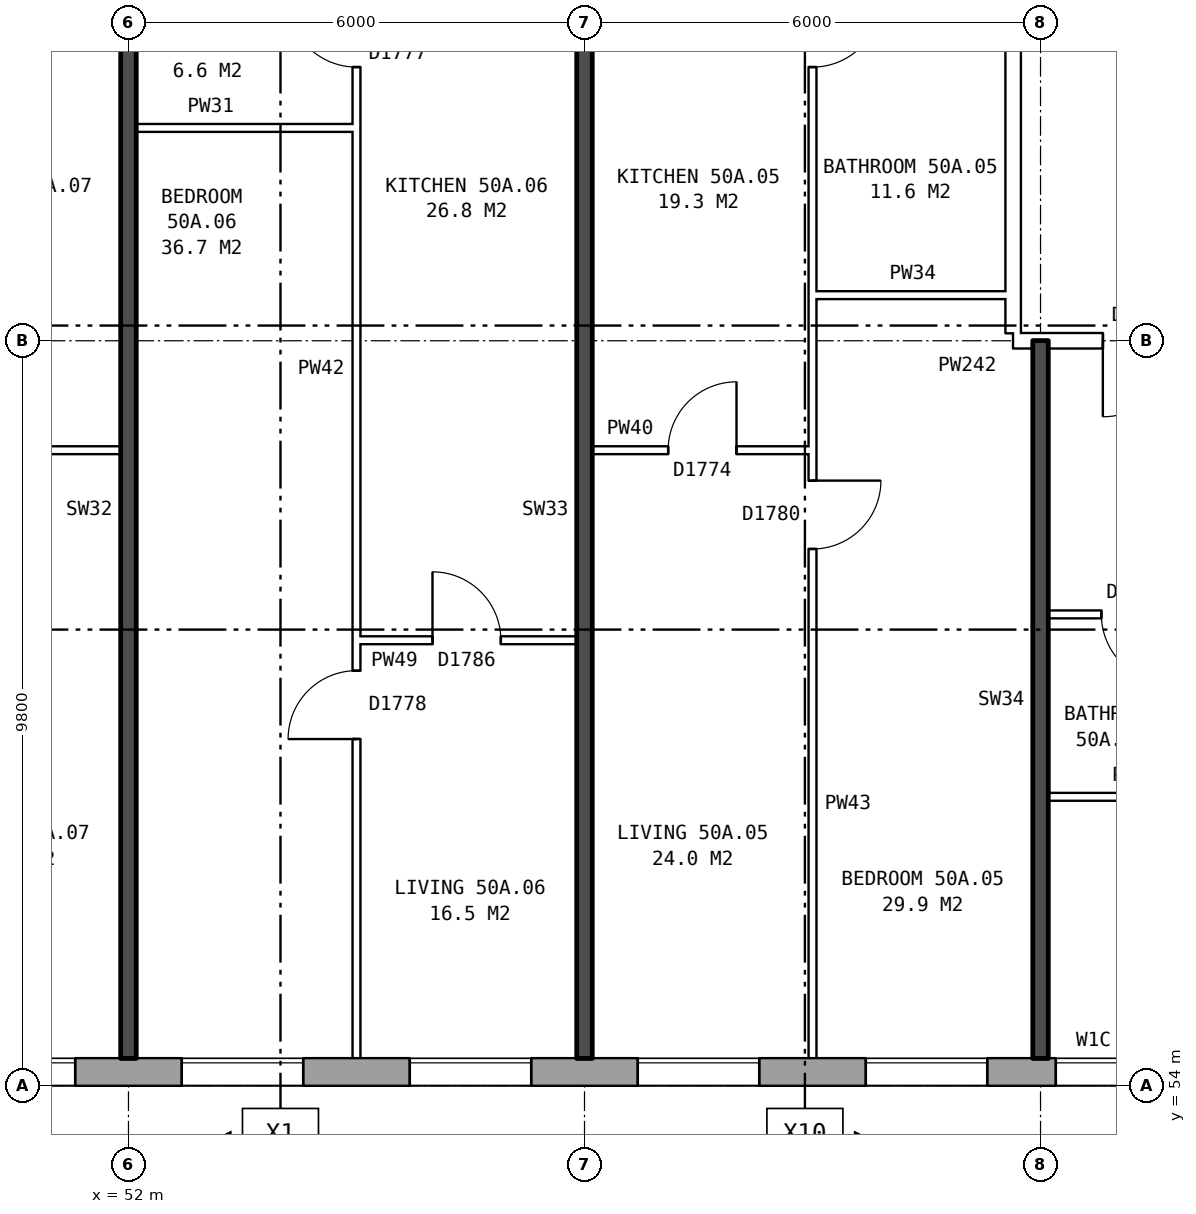
"""IFC4 building model, lengths in metres.
Left out: names, types, materials, properties, quantities, classifications, styles, units other than length and angle.
Written with IfcOpenShell. Run it as: python <this file> out.ifc"""

import sys

from ifc_helpers import new_model, si_unit, direction, frame, frame_2d, origin, place, context, subcontext, project, spatial, rectangle, extrude, element, fill, save


model = new_model("IFC4")
c1 = context("Model", 3, precision=1e-05, world=origin(), true_north=direction((0.0, 1.0)))
c2 = subcontext(c1, "Body", "Model", "MODEL_VIEW")
j1 = project(units=[si_unit("LENGTHUNIT", "METRE"), si_unit("PLANEANGLEUNIT", "RADIAN")], contexts=[c1])
p1 = place(None, origin())
s1 = spatial("IfcSite", under=j1, at=p1, CompositionType="ELEMENT")
p2 = place(p1, origin())
s2 = spatial("IfcBuilding", under=s1, at=p2, CompositionType="ELEMENT")
p3 = place(p2, frame((0.0, 0.0, 178.9)))
s3 = spatial("IfcBuildingStorey", under=s2, at=p3, CompositionType="ELEMENT", Elevation=178.9)
p4 = place(p3, frame((33.325, 54.18, 0.0), z_axis=(0.0, 0.0, 1.0), x_axis=(1.0, 0.0, 0.0)))
e1 = element("IfcWall", 1, at=p4, inside=s3, PredefinedType="STANDARD", context=c2, shape_type="SweptSolid", body=[
    extrude(rectangle(XDim=39.601, YDim=0.36, at=frame_2d((19.8, 0.0))), origin(), (0.0, 0.0, 1.0), 2.85),
])
p5 = place(p4, frame((1.375, 0.0, 0.8)))
e2 = element("IfcOpeningElement", 2, at=p5, cuts=e1, PredefinedType="OPENING", context=c2, shape_type="SweptSolid", body=[
    extrude(rectangle(XDim=1.6, YDim=1.8, at=frame_2d((0.8, 0.9))), frame((0.0, 0.19, 0.0), z_axis=(0.0, -1.0, 0.0), x_axis=(1.0, 0.0, 0.0)), (0.0, 0.0, 1.0), 0.38),
])
p6 = place(p4, frame((3.275, 0.0, 0.8)))
e3 = element("IfcOpeningElement", 3, at=p6, cuts=e1, PredefinedType="OPENING", context=c2, shape_type="SweptSolid", body=[
    extrude(rectangle(XDim=1.4, YDim=1.8, at=frame_2d((0.7, 0.9))), frame((0.0, 0.19, 0.0), z_axis=(0.0, -1.0, 0.0), x_axis=(1.0, 0.0, 0.0)), (0.0, 0.0, 1.0), 0.38),
])
p7 = place(p4, frame((7.375, 0.0, 0.8)))
e4 = element("IfcOpeningElement", 4, at=p7, cuts=e1, PredefinedType="OPENING", context=c2, shape_type="SweptSolid", body=[
    extrude(rectangle(XDim=1.6, YDim=1.8, at=frame_2d((0.8, 0.9))), frame((0.0, 0.19, 0.0), z_axis=(0.0, -1.0, 0.0), x_axis=(1.0, 0.0, 0.0)), (0.0, 0.0, 1.0), 0.38),
])
p8 = place(p4, frame((10.375, 0.0, 0.8)))
e5 = element("IfcOpeningElement", 5, at=p8, cuts=e1, PredefinedType="OPENING", context=c2, shape_type="SweptSolid", body=[
    extrude(rectangle(XDim=1.6, YDim=1.8, at=frame_2d((0.8, 0.9))), frame((0.0, 0.19, 0.0), z_axis=(0.0, -1.0, 0.0), x_axis=(1.0, 0.0, 0.0)), (0.0, 0.0, 1.0), 0.38),
])
p9 = place(p4, frame((13.375, 0.0, 0.8)))
e6 = element("IfcOpeningElement", 6, at=p9, cuts=e1, PredefinedType="OPENING", context=c2, shape_type="SweptSolid", body=[
    extrude(rectangle(XDim=1.6, YDim=1.8, at=frame_2d((0.8, 0.9))), frame((0.0, 0.19, 0.0), z_axis=(0.0, -1.0, 0.0), x_axis=(1.0, 0.0, 0.0)), (0.0, 0.0, 1.0), 0.38),
])
p10 = place(p4, frame((16.375, 0.0, 0.8)))
e7 = element("IfcOpeningElement", 7, at=p10, cuts=e1, PredefinedType="OPENING", context=c2, shape_type="SweptSolid", body=[
    extrude(rectangle(XDim=1.6, YDim=1.8, at=frame_2d((0.8, 0.9))), frame((0.0, 0.19, 0.0), z_axis=(0.0, -1.0, 0.0), x_axis=(1.0, 0.0, 0.0)), (0.0, 0.0, 1.0), 0.38),
])
p11 = place(p4, frame((19.375, 0.0, 0.8)))
e8 = element("IfcOpeningElement", 8, at=p11, cuts=e1, PredefinedType="OPENING", context=c2, shape_type="SweptSolid", body=[
    extrude(rectangle(XDim=1.6, YDim=1.8, at=frame_2d((0.8, 0.9))), frame((0.0, 0.19, 0.0), z_axis=(0.0, -1.0, 0.0), x_axis=(1.0, 0.0, 0.0)), (0.0, 0.0, 1.0), 0.38),
])
p12 = place(p4, frame((22.375, 0.0, 0.8)))
e9 = element("IfcOpeningElement", 9, at=p12, cuts=e1, PredefinedType="OPENING", context=c2, shape_type="SweptSolid", body=[
    extrude(rectangle(XDim=1.6, YDim=1.8, at=frame_2d((0.8, 0.9))), frame((0.0, 0.19, 0.0), z_axis=(0.0, -1.0, 0.0), x_axis=(1.0, 0.0, 0.0)), (0.0, 0.0, 1.0), 0.38),
])
p13 = place(p4, frame((25.375, 0.0, 0.8)))
e10 = element("IfcOpeningElement", 10, at=p13, cuts=e1, PredefinedType="OPENING", context=c2, shape_type="SweptSolid", body=[
    extrude(rectangle(XDim=1.6, YDim=1.8, at=frame_2d((0.8, 0.9))), frame((0.0, 0.19, 0.0), z_axis=(0.0, -1.0, 0.0), x_axis=(1.0, 0.0, 0.0)), (0.0, 0.0, 1.0), 0.38),
])
p14 = place(p4, frame((28.375, 0.0, 0.8)))
e11 = element("IfcOpeningElement", 11, at=p14, cuts=e1, PredefinedType="OPENING", context=c2, shape_type="SweptSolid", body=[
    extrude(rectangle(XDim=1.6, YDim=1.8, at=frame_2d((0.8, 0.9))), frame((0.0, 0.19, 0.0), z_axis=(0.0, -1.0, 0.0), x_axis=(1.0, 0.0, 0.0)), (0.0, 0.0, 1.0), 0.38),
])
p15 = place(p4, frame((30.875, 0.0, 0.8)))
e12 = element("IfcOpeningElement", 12, at=p15, cuts=e1, PredefinedType="OPENING", context=c2, shape_type="SweptSolid", body=[
    extrude(rectangle(XDim=1.0, YDim=1.8, at=frame_2d((0.5, 0.9))), frame((0.0, 0.19, 0.0), z_axis=(0.0, -1.0, 0.0), x_axis=(1.0, 0.0, 0.0)), (0.0, 0.0, 1.0), 0.38),
])
p16 = place(p4, frame((32.175, 0.0, 0.8)))
e13 = element("IfcOpeningElement", 13, at=p16, cuts=e1, PredefinedType="OPENING", context=c2, shape_type="SweptSolid", body=[
    extrude(rectangle(XDim=0.6, YDim=0.9, at=frame_2d((0.3, 0.45))), frame((0.0, 0.19, 0.0), z_axis=(0.0, -1.0, 0.0), x_axis=(1.0, 0.0, 0.0)), (0.0, 0.0, 1.0), 0.38),
])
p17 = place(p4, frame((37.375, 0.0, 0.8)))
e14 = element("IfcOpeningElement", 14, at=p17, cuts=e1, PredefinedType="OPENING", context=c2, shape_type="SweptSolid", body=[
    extrude(rectangle(XDim=1.6, YDim=1.8, at=frame_2d((0.8, 0.9))), frame((0.0, 0.19, 0.0), z_axis=(0.0, -1.0, 0.0), x_axis=(1.0, 0.0, 0.0)), (0.0, 0.0, 1.0), 0.38),
])
p18 = place(p4, frame((4.975, 0.0, 1.6)))
e15 = element("IfcOpeningElement", 15, at=p18, cuts=e1, PredefinedType="OPENING", context=c2, shape_type="SweptSolid", body=[
    extrude(rectangle(XDim=0.6, YDim=0.9, at=frame_2d((0.3, 0.45))), frame((0.0, 0.19, 0.0), z_axis=(0.0, -1.0, 0.0), x_axis=(1.0, 0.0, 0.0)), (0.0, 0.0, 1.0), 0.38),
])
p19 = place(p4, frame((33.925, 0.0, 1.7)))
e16 = element("IfcOpeningElement", 16, at=p19, cuts=e1, PredefinedType="OPENING", context=c2, shape_type="SweptSolid", body=[
    extrude(rectangle(XDim=0.6, YDim=0.9, at=frame_2d((0.3, 0.45))), frame((0.0, 0.19, 0.0), z_axis=(0.0, -1.0, 0.0), x_axis=(1.0, 0.0, 0.0)), (0.0, 0.0, 1.0), 0.38),
])
p20 = place(p4, frame((34.825, 0.0, 0.8)))
e17 = element("IfcOpeningElement", 17, at=p20, cuts=e1, PredefinedType="OPENING", context=c2, shape_type="SweptSolid", body=[
    extrude(rectangle(XDim=1.6, YDim=1.8, at=frame_2d((0.8, 0.9))), frame((0.0, 0.19, 0.0), z_axis=(0.0, -1.0, 0.0), x_axis=(1.0, 0.0, 0.0)), (0.0, 0.0, 1.0), 0.38),
])
p21 = place(p3, frame((63.64, 63.9, 0.0), z_axis=(0.0, 0.0, 1.0), x_axis=(0.0, 1.0, 0.0)))
e18 = element("IfcWall", 18, at=p21, inside=s3, PredefinedType="PARTITIONING", context=c2, shape_type="SweptSolid", body=[
    extrude(rectangle(XDim=12.2, YDim=0.2, at=frame_2d((6.1, 0.0))), origin(), (0.0, 0.0, 1.0), 2.85),
])
p22 = place(p21, frame((5.1, 0.0, 0.0)))
e19 = element("IfcOpeningElement", 19, at=p22, cuts=e18, PredefinedType="OPENING", context=c2, shape_type="SweptSolid", body=[
    extrude(rectangle(XDim=2.0, YDim=2.1, at=frame_2d((1.0, 1.05))), frame((0.0, 0.11, 0.0), z_axis=(0.0, -1.0, 0.0), x_axis=(1.0, 0.0, 0.0)), (0.0, 0.0, 1.0), 0.22),
])
p23 = place(p3, frame((64.1, 57.8, 0.0), z_axis=(0.0, 0.0, 1.0), x_axis=(1.0, 0.0, 0.0)))
e20 = element("IfcWall", 20, at=p23, inside=s3, PredefinedType="PARTITIONING", context=c2, shape_type="SweptSolid", body=[
    extrude(rectangle(XDim=2.3, YDim=0.1, at=frame_2d((1.15, 0.0))), origin(), (0.0, 0.0, 1.0), 2.85),
])
p24 = place(p3, frame((55.0, 59.86, 0.0), z_axis=(0.0, 0.0, 1.0), x_axis=(1.0, 0.0, 0.0)))
e21 = element("IfcWall", 21, at=p24, inside=s3, PredefinedType="PARTITIONING", context=c2, shape_type="SweptSolid", body=[
    extrude(rectangle(XDim=2.9, YDim=0.1, at=frame_2d((1.45, 0.0))), origin(), (0.0, 0.0, 1.0), 2.85),
])
p25 = place(p24, frame((1.0, 0.0, 0.0)))
e22 = element("IfcOpeningElement", 22, at=p25, cuts=e21, PredefinedType="OPENING", context=c2, shape_type="SweptSolid", body=[
    extrude(rectangle(XDim=0.9, YDim=2.1, at=frame_2d((0.45, 1.05))), frame((0.0, 0.06, 0.0), z_axis=(0.0, -1.0, 0.0), x_axis=(1.0, 0.0, 0.0)), (0.0, 0.0, 1.0), 0.12),
])
p26 = place(p3, frame((64.1, 60.2, 0.0), z_axis=(0.0, 0.0, 1.0), x_axis=(1.0, 0.0, 0.0)))
e23 = element("IfcWall", 23, at=p26, inside=s3, PredefinedType="PARTITIONING", context=c2, shape_type="SweptSolid", body=[
    extrude(rectangle(XDim=5.8, YDim=0.1, at=frame_2d((2.9, 0.0))), origin(), (0.0, 0.0, 1.0), 2.85),
])
p27 = place(p26, frame((3.6, 0.0, 0.0)))
e24 = element("IfcOpeningElement", 24, at=p27, cuts=e23, PredefinedType="OPENING", context=c2, shape_type="SweptSolid", body=[
    extrude(rectangle(XDim=0.9, YDim=2.1, at=frame_2d((0.45, 1.05))), frame((0.0, 0.06, 0.0), z_axis=(0.0, -1.0, 0.0), x_axis=(1.0, 0.0, 0.0)), (0.0, 0.0, 1.0), 0.12),
])
p28 = place(p26, frame((0.7, 0.0, 0.0)))
e25 = element("IfcOpeningElement", 25, at=p28, cuts=e23, PredefinedType="OPENING", context=c2, shape_type="SweptSolid", body=[
    extrude(rectangle(XDim=0.9, YDim=2.1, at=frame_2d((0.45, 1.05))), frame((0.0, 0.06, 0.0), z_axis=(0.0, -1.0, 0.0), x_axis=(1.0, 0.0, 0.0)), (0.0, 0.0, 1.0), 0.12),
])
p29 = place(p3, frame((49.0, 62.36, 0.0), z_axis=(0.0, 0.0, 1.0), x_axis=(1.0, 0.0, 0.0)))
e26 = element("IfcWall", 26, at=p29, inside=s3, PredefinedType="PARTITIONING", context=c2, shape_type="SweptSolid", body=[
    extrude(rectangle(XDim=2.9, YDim=0.1, at=frame_2d((1.45, 0.0))), origin(), (0.0, 0.0, 1.0), 2.85),
])
p30 = place(p29, frame((1.0, 0.0, 0.0)))
e27 = element("IfcOpeningElement", 27, at=p30, cuts=e26, PredefinedType="OPENING", context=c2, shape_type="SweptSolid", body=[
    extrude(rectangle(XDim=0.9, YDim=2.1, at=frame_2d((0.45, 1.05))), frame((0.0, 0.06, 0.0), z_axis=(0.0, -1.0, 0.0), x_axis=(1.0, 0.0, 0.0)), (0.0, 0.0, 1.0), 0.12),
])
p31 = place(p3, frame((58.1, 62.36, 0.0), z_axis=(0.0, 0.0, 1.0), x_axis=(1.0, 0.0, 0.0)))
e28 = element("IfcWall", 28, at=p31, inside=s3, PredefinedType="PARTITIONING", context=c2, shape_type="SweptSolid", body=[
    extrude(rectangle(XDim=2.9, YDim=0.1, at=frame_2d((1.45, 0.0))), origin(), (0.0, 0.0, 1.0), 2.85),
])
p32 = place(p31, frame((1.0, 0.0, 0.0)))
e29 = element("IfcOpeningElement", 29, at=p32, cuts=e28, PredefinedType="OPENING", context=c2, shape_type="SweptSolid", body=[
    extrude(rectangle(XDim=0.9, YDim=2.1, at=frame_2d((0.45, 1.05))), frame((0.0, 0.06, 0.0), z_axis=(0.0, -1.0, 0.0), x_axis=(1.0, 0.0, 0.0)), (0.0, 0.0, 1.0), 0.12),
])
p33 = place(p3, frame((63.64, 63.8, 0.0), z_axis=(0.0, 0.0, 1.0), x_axis=(1.0, 0.0, 0.0)))
e30 = element("IfcWall", 30, at=p33, inside=s3, PredefinedType="PARTITIONING", context=c2, shape_type="SweptSolid", body=[
    extrude(rectangle(XDim=3.0, YDim=0.2, at=frame_2d((1.5, 0.0))), origin(), (0.0, 0.0, 1.0), 2.85),
])
p34 = place(p33, frame((1.18, 0.0, 0.0)))
e31 = element("IfcOpeningElement", 31, at=p34, cuts=e30, PredefinedType="OPENING", context=c2, shape_type="SweptSolid", body=[
    extrude(rectangle(XDim=1.0, YDim=2.1, at=frame_2d((0.5, 1.05))), frame((0.0, 0.11, 0.0), z_axis=(0.0, -1.0, 0.0), x_axis=(1.0, 0.0, 0.0)), (0.0, 0.0, 1.0), 0.22),
])
p35 = place(p3, frame((61.0, 64.4, 0.0), z_axis=(0.0, 0.0, 1.0), x_axis=(1.0, 0.0, 0.0)))
e32 = element("IfcWall", 32, at=p35, inside=s3, PredefinedType="PARTITIONING", context=c2, shape_type="SweptSolid", body=[
    extrude(rectangle(XDim=2.64, YDim=0.1, at=frame_2d((1.32, 0.0))), origin(), (0.0, 0.0, 1.0), 2.85),
])
p36 = place(p3, frame((52.1, 66.6, 0.0), z_axis=(0.0, 0.0, 1.0), x_axis=(1.0, 0.0, 0.0)))
e33 = element("IfcWall", 33, at=p36, inside=s3, PredefinedType="PARTITIONING", context=c2, shape_type="SweptSolid", body=[
    extrude(rectangle(XDim=2.9, YDim=0.1, at=frame_2d((1.45, 0.0))), origin(), (0.0, 0.0, 1.0), 2.85),
])
p37 = place(p3, frame((52.0, 54.36, 0.0), z_axis=(0.0, 0.0, 1.0), x_axis=(0.0, 1.0, 0.0)))
e34 = element("IfcWall", 34, at=p37, inside=s3, PredefinedType="SOLIDWALL", context=c2, shape_type="SweptSolid", body=[
    extrude(rectangle(XDim=14.44, YDim=0.2, at=frame_2d((7.22, 0.0))), origin(), (0.0, 0.0, 1.0), 2.85),
])
p38 = place(p3, frame((55.0, 54.36, 0.0), z_axis=(0.0, 0.0, 1.0), x_axis=(0.0, 1.0, 0.0)))
e35 = element("IfcWall", 35, at=p38, inside=s3, PredefinedType="PARTITIONING", context=c2, shape_type="SweptSolid", body=[
    extrude(rectangle(XDim=14.34, YDim=0.1, at=frame_2d((7.17, 0.0))), origin(), (0.0, 0.0, 1.0), 2.85),
])
p39 = place(p38, frame((4.2, 0.0, 0.0)))
e36 = element("IfcOpeningElement", 36, at=p39, cuts=e35, PredefinedType="OPENING", context=c2, shape_type="SweptSolid", body=[
    extrude(rectangle(XDim=0.9, YDim=2.1, at=frame_2d((0.45, 1.05))), frame((0.0, 0.06, 0.0), z_axis=(0.0, -1.0, 0.0), x_axis=(1.0, 0.0, 0.0)), (0.0, 0.0, 1.0), 0.12),
])
p40 = place(p38, frame((13.04, 0.0, 0.0)))
e37 = element("IfcOpeningElement", 37, at=p40, cuts=e35, PredefinedType="OPENING", context=c2, shape_type="SweptSolid", body=[
    extrude(rectangle(XDim=0.9, YDim=2.1, at=frame_2d((0.45, 1.05))), frame((0.0, 0.06, 0.0), z_axis=(0.0, -1.0, 0.0), x_axis=(1.0, 0.0, 0.0)), (0.0, 0.0, 1.0), 0.12),
])
p41 = place(p3, frame((58.0, 54.36, 0.0), z_axis=(0.0, 0.0, 1.0), x_axis=(0.0, 1.0, 0.0)))
e38 = element("IfcWall", 38, at=p41, inside=s3, PredefinedType="SOLIDWALL", context=c2, shape_type="SweptSolid", body=[
    extrude(rectangle(XDim=14.44, YDim=0.2, at=frame_2d((7.22, 0.0))), origin(), (0.0, 0.0, 1.0), 2.85),
])
p42 = place(p3, frame((61.0, 54.36, 0.0), z_axis=(0.0, 0.0, 1.0), x_axis=(0.0, 1.0, 0.0)))
e39 = element("IfcWall", 39, at=p42, inside=s3, PredefinedType="PARTITIONING", context=c2, shape_type="SweptSolid", body=[
    extrude(rectangle(XDim=14.34, YDim=0.1, at=frame_2d((7.17, 0.0))), origin(), (0.0, 0.0, 1.0), 2.85),
])
p43 = place(p42, frame((6.7, 0.0, 0.0)))
e40 = element("IfcOpeningElement", 40, at=p43, cuts=e39, PredefinedType="OPENING", context=c2, shape_type="SweptSolid", body=[
    extrude(rectangle(XDim=0.9, YDim=2.1, at=frame_2d((0.45, 1.05))), frame((0.0, 0.06, 0.0), z_axis=(0.0, -1.0, 0.0), x_axis=(1.0, 0.0, 0.0)), (0.0, 0.0, 1.0), 0.12),
])
p44 = place(p42, frame((13.04, 0.0, 0.0)))
e41 = element("IfcOpeningElement", 41, at=p44, cuts=e39, PredefinedType="OPENING", context=c2, shape_type="SweptSolid", body=[
    extrude(rectangle(XDim=0.9, YDim=2.1, at=frame_2d((0.45, 1.05))), frame((0.0, 0.06, 0.0), z_axis=(0.0, -1.0, 0.0), x_axis=(1.0, 0.0, 0.0)), (0.0, 0.0, 1.0), 0.12),
])
p45 = place(p3, frame((64.0, 54.36, 0.0), z_axis=(0.0, 0.0, 1.0), x_axis=(0.0, 1.0, 0.0)))
e42 = element("IfcWall", 42, at=p45, inside=s3, PredefinedType="SOLIDWALL", context=c2, shape_type="SweptSolid", body=[
    extrude(rectangle(XDim=9.44, YDim=0.2, at=frame_2d((4.72, 0.0))), origin(), (0.0, 0.0, 1.0), 2.85),
])
p46 = place(p10, origin())
e43 = element("IfcWindow", 43, at=p46, inside=s3, PartitioningType="SINGLE_PANEL", PredefinedType="WINDOW", context=c2, shape_type="SweptSolid", body=[
    extrude(rectangle(XDim=1.6, YDim=1.8, at=frame_2d((0.8, 0.9))), frame((0.0, 0.15, 0.0), z_axis=(0.0, -1.0, 0.0), x_axis=(1.0, 0.0, 0.0)), (0.0, 0.0, 1.0), 0.06),
])
fill(e7, e43)
p47 = place(p11, origin())
e44 = element("IfcWindow", 44, at=p47, inside=s3, PartitioningType="SINGLE_PANEL", PredefinedType="WINDOW", context=c2, shape_type="SweptSolid", body=[
    extrude(rectangle(XDim=1.6, YDim=1.8, at=frame_2d((0.8, 0.9))), frame((0.0, 0.15, 0.0), z_axis=(0.0, -1.0, 0.0), x_axis=(1.0, 0.0, 0.0)), (0.0, 0.0, 1.0), 0.06),
])
fill(e8, e44)
p48 = place(p12, origin())
e45 = element("IfcWindow", 45, at=p48, inside=s3, PartitioningType="SINGLE_PANEL", PredefinedType="WINDOW", context=c2, shape_type="SweptSolid", body=[
    extrude(rectangle(XDim=1.6, YDim=1.8, at=frame_2d((0.8, 0.9))), frame((0.0, 0.15, 0.0), z_axis=(0.0, -1.0, 0.0), x_axis=(1.0, 0.0, 0.0)), (0.0, 0.0, 1.0), 0.06),
])
fill(e9, e45)
p49 = place(p13, origin())
e46 = element("IfcWindow", 46, at=p49, inside=s3, PartitioningType="SINGLE_PANEL", PredefinedType="WINDOW", context=c2, shape_type="SweptSolid", body=[
    extrude(rectangle(XDim=1.6, YDim=1.8, at=frame_2d((0.8, 0.9))), frame((0.0, 0.15, 0.0), z_axis=(0.0, -1.0, 0.0), x_axis=(1.0, 0.0, 0.0)), (0.0, 0.0, 1.0), 0.06),
])
fill(e10, e46)
p50 = place(p14, origin())
e47 = element("IfcWindow", 47, at=p50, inside=s3, PartitioningType="SINGLE_PANEL", PredefinedType="WINDOW", context=c2, shape_type="SweptSolid", body=[
    extrude(rectangle(XDim=1.6, YDim=1.8, at=frame_2d((0.8, 0.9))), frame((0.0, 0.15, 0.0), z_axis=(0.0, -1.0, 0.0), x_axis=(1.0, 0.0, 0.0)), (0.0, 0.0, 1.0), 0.06),
])
fill(e11, e47)
p51 = place(p15, origin())
e48 = element("IfcWindow", 48, at=p51, inside=s3, PartitioningType="SINGLE_PANEL", PredefinedType="WINDOW", context=c2, shape_type="SweptSolid", body=[
    extrude(rectangle(XDim=1.0, YDim=1.8, at=frame_2d((0.5, 0.9))), frame((0.0, 0.15, 0.0), z_axis=(0.0, -1.0, 0.0), x_axis=(1.0, 0.0, 0.0)), (0.0, 0.0, 1.0), 0.06),
])
fill(e12, e48)
p52 = place(p34, frame((1.0, 0.0, 0.0), z_axis=(0.0, 0.0, 1.0), x_axis=(-1.0, 0.0, 0.0)))
e49 = element("IfcDoor", 49, at=p52, inside=s3, OperationType="SINGLE_SWING_RIGHT", PredefinedType="DOOR", context=c2, shape_type="SweptSolid", body=[
    extrude(rectangle(XDim=1.0, YDim=2.1, at=frame_2d((0.5, 1.05))), frame((0.0, 0.025, 0.0), z_axis=(0.0, -1.0, 0.0), x_axis=(1.0, 0.0, 0.0)), (0.0, 0.0, 1.0), 0.05),
])
fill(e31, e49)
p53 = place(p28, frame((0.9, 0.0, 0.0), z_axis=(0.0, 0.0, 1.0), x_axis=(-1.0, 0.0, 0.0)))
e50 = element("IfcDoor", 50, at=p53, inside=s3, OperationType="SINGLE_SWING_LEFT", PredefinedType="DOOR", context=c2, shape_type="SweptSolid", body=[
    extrude(rectangle(XDim=0.9, YDim=2.1, at=frame_2d((0.45, 1.05))), frame((0.0, 0.025, 0.0), z_axis=(0.0, -1.0, 0.0), x_axis=(1.0, 0.0, 0.0)), (0.0, 0.0, 1.0), 0.05),
])
fill(e25, e50)
p54 = place(p43, frame((0.9, 0.0, 0.0), z_axis=(0.0, 0.0, 1.0), x_axis=(-1.0, 0.0, 0.0)))
e51 = element("IfcDoor", 51, at=p54, inside=s3, OperationType="SINGLE_SWING_LEFT", PredefinedType="DOOR", context=c2, shape_type="SweptSolid", body=[
    extrude(rectangle(XDim=0.9, YDim=2.1, at=frame_2d((0.45, 1.05))), frame((0.0, 0.025, 0.0), z_axis=(0.0, -1.0, 0.0), x_axis=(1.0, 0.0, 0.0)), (0.0, 0.0, 1.0), 0.05),
])
fill(e40, e51)
p55 = place(p32, origin())
e52 = element("IfcDoor", 52, at=p55, inside=s3, OperationType="SINGLE_SWING_RIGHT", PredefinedType="DOOR", context=c2, shape_type="SweptSolid", body=[
    extrude(rectangle(XDim=0.9, YDim=2.1, at=frame_2d((0.45, 1.05))), frame((0.0, 0.025, 0.0), z_axis=(0.0, -1.0, 0.0), x_axis=(1.0, 0.0, 0.0)), (0.0, 0.0, 1.0), 0.05),
])
fill(e29, e52)
p56 = place(p44, frame((0.9, 0.0, 0.0), z_axis=(0.0, 0.0, 1.0), x_axis=(-1.0, 0.0, 0.0)))
e53 = element("IfcDoor", 53, at=p56, inside=s3, OperationType="SINGLE_SWING_LEFT", PredefinedType="DOOR", context=c2, shape_type="SweptSolid", body=[
    extrude(rectangle(XDim=0.9, YDim=2.1, at=frame_2d((0.45, 1.05))), frame((0.0, 0.025, 0.0), z_axis=(0.0, -1.0, 0.0), x_axis=(1.0, 0.0, 0.0)), (0.0, 0.0, 1.0), 0.05),
])
fill(e41, e53)
p57 = place(p39, origin())
e54 = element("IfcDoor", 54, at=p57, inside=s3, OperationType="SINGLE_SWING_LEFT", PredefinedType="DOOR", context=c2, shape_type="SweptSolid", body=[
    extrude(rectangle(XDim=0.9, YDim=2.1, at=frame_2d((0.45, 1.05))), frame((0.0, 0.025, 0.0), z_axis=(0.0, -1.0, 0.0), x_axis=(1.0, 0.0, 0.0)), (0.0, 0.0, 1.0), 0.05),
])
fill(e36, e54)
p58 = place(p25, origin())
e55 = element("IfcDoor", 55, at=p58, inside=s3, OperationType="SINGLE_SWING_LEFT", PredefinedType="DOOR", context=c2, shape_type="SweptSolid", body=[
    extrude(rectangle(XDim=0.9, YDim=2.1, at=frame_2d((0.45, 1.05))), frame((0.0, 0.025, 0.0), z_axis=(0.0, -1.0, 0.0), x_axis=(1.0, 0.0, 0.0)), (0.0, 0.0, 1.0), 0.05),
])
fill(e22, e55)
p59 = place(p40, origin())
e56 = element("IfcDoor", 56, at=p59, inside=s3, OperationType="SINGLE_SWING_RIGHT", PredefinedType="DOOR", context=c2, shape_type="SweptSolid", body=[
    extrude(rectangle(XDim=0.9, YDim=2.1, at=frame_2d((0.45, 1.05))), frame((0.0, 0.025, 0.0), z_axis=(0.0, -1.0, 0.0), x_axis=(1.0, 0.0, 0.0)), (0.0, 0.0, 1.0), 0.05),
])
fill(e37, e56)
save(model, sys.argv[1])
